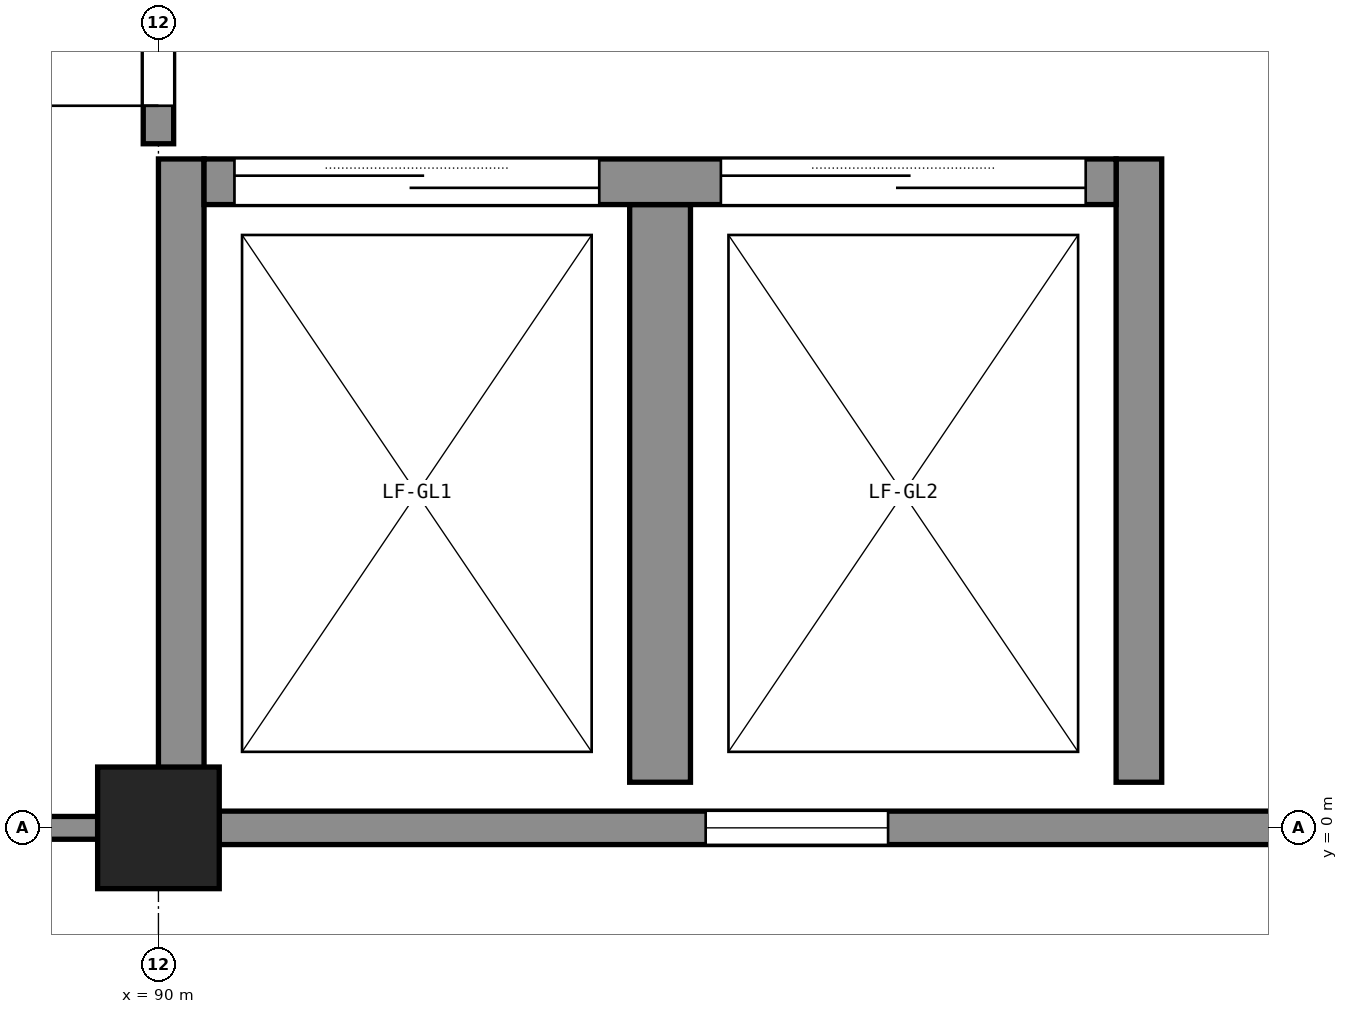
"""IFC4 building model, lengths in metres.
Left out: names, types, materials, properties, quantities, classifications, styles, units other than length and angle.
Written with IfcOpenShell. Run it as: python <this file> out.ifc"""

import sys

from ifc_helpers import new_model, si_unit, direction, frame, frame_2d, origin, origin_2d, place, context, subcontext, project, spatial, rectangle, extrude, element, fill, save


model = new_model("IFC4")
c1 = context("Model", 3, precision=1e-05, world=origin(), true_north=direction((0.0, 1.0)))
c2 = subcontext(c1, "Body", "Model", "MODEL_VIEW")
j1 = project(units=[si_unit("LENGTHUNIT", "METRE"), si_unit("PLANEANGLEUNIT", "RADIAN")], contexts=[c1])
p1 = place(None, origin())
s1 = spatial("IfcSite", under=j1, at=p1, CompositionType="ELEMENT")
p2 = place(p1, origin())
s2 = spatial("IfcBuilding", under=s1, at=p2, CompositionType="ELEMENT")
p3 = place(p2, origin())
s3 = spatial("IfcBuildingStorey", under=s2, at=p3, CompositionType="ELEMENT", Elevation=0.0)
for number, where, z_axis, x_axis in (
    (1, (90.15, 0.3, -1.8), (0.0, 0.0, 1.0), (0.0, 1.0, 0.0)),
    (2, (96.45, 0.3, -1.8), (0.0, 0.0, 1.0), (0.0, 1.0, 0.0)),
):
    element("IfcWall", number, at=place(p3, frame(where, z_axis=z_axis, x_axis=x_axis)), inside=s3, PredefinedType="SHEAR", context=c2, shape_type="SweptSolid", body=[
        extrude(rectangle(XDim=4.1, YDim=0.3, at=frame_2d((2.05, 0.0))), origin(), (0.0, 0.0, 1.0), 7.3),
    ])
p4 = place(p3, frame((90.3, 4.25, -1.8), z_axis=(0.0, 0.0, 1.0), x_axis=(1.0, 0.0, 0.0)))
e3 = element("IfcWall", 3, at=p4, inside=s3, PredefinedType="SHEAR", context=c2, shape_type="SweptSolid", body=[
    extrude(rectangle(XDim=6.0, YDim=0.3, at=frame_2d((3.0, 0.0))), origin(), (0.0, 0.0, 1.0), 7.3),
])
p5 = place(p4, frame((0.2, 0.0, 1.8)))
e4 = element("IfcOpeningElement", 4, at=p5, cuts=e3, PredefinedType="OPENING", context=c2, shape_type="SweptSolid", body=[
    extrude(rectangle(XDim=2.4, YDim=2.4, at=frame_2d((1.2, 1.2))), frame((0.0, 0.16, 0.0), z_axis=(0.0, -1.0, 0.0), x_axis=(1.0, 0.0, 0.0)), (0.0, 0.0, 1.0), 0.32),
])
p6 = place(p4, frame((3.4, 0.0, 1.8)))
e5 = element("IfcOpeningElement", 5, at=p6, cuts=e3, PredefinedType="OPENING", context=c2, shape_type="SweptSolid", body=[
    extrude(rectangle(XDim=2.4, YDim=2.4, at=frame_2d((1.2, 1.2))), frame((0.0, 0.16, 0.0), z_axis=(0.0, -1.0, 0.0), x_axis=(1.0, 0.0, 0.0)), (0.0, 0.0, 1.0), 0.32),
])
p7 = place(p3, frame((93.3, 0.3, -1.8), z_axis=(0.0, 0.0, 1.0), x_axis=(0.0, 1.0, 0.0)))
e6 = element("IfcWall", 6, at=p7, inside=s3, PredefinedType="SHEAR", context=c2, shape_type="SweptSolid", body=[
    extrude(rectangle(XDim=3.8, YDim=0.4, at=frame_2d((1.9, 0.0))), origin(), (0.0, 0.0, 1.0), 7.3),
])
p8 = place(p3, frame((90.0, 0.0, -0.3), z_axis=(0.0, 0.0, 1.0), x_axis=(1.0, 0.0, 0.0)))
e7 = element("IfcColumn", 7, at=p8, inside=s3, PredefinedType="COLUMN", context=c2, shape_type="SweptSolid", body=[
    extrude(rectangle(XDim=0.8, YDim=0.8, at=origin_2d()), origin(), (0.0, 0.0, 1.0), 5.8),
])
p9 = place(p3, frame((82.0, 0.0, 0.0), z_axis=(0.0, 0.0, 1.0), x_axis=(1.0, 0.0, 0.0)))
e8 = element("IfcWall", 8, at=p9, inside=s3, PredefinedType="ELEMENTEDWALL", context=c2, shape_type="SweptSolid", body=[
    extrude(rectangle(XDim=7.6, YDim=0.15, at=frame_2d((3.8, 0.0))), origin(), (0.0, 0.0, 1.0), 4.44),
])
p10 = place(p9, frame((1.7, 0.0, 0.0)))
e9 = element("IfcOpeningElement", 9, at=p10, cuts=e8, PredefinedType="OPENING", context=c2, shape_type="SweptSolid", body=[
    extrude(rectangle(XDim=4.2, YDim=4.34, at=frame_2d((2.1, 2.17))), frame((0.0, 0.085, 0.0), z_axis=(0.0, -1.0, 0.0), x_axis=(1.0, 0.0, 0.0)), (0.0, 0.0, 1.0), 0.17),
])
p11 = place(p3, frame((90.4, 0.0, 0.0), z_axis=(0.0, 0.0, 1.0), x_axis=(1.0, 0.0, 0.0)))
e10 = element("IfcWall", 10, at=p11, inside=s3, PredefinedType="SOLIDWALL", context=c2, shape_type="SweptSolid", body=[
    extrude(rectangle(XDim=7.6, YDim=0.22, at=frame_2d((3.8, 0.0))), origin(), (0.0, 0.0, 1.0), 4.44),
])
p12 = place(p11, frame((3.2, 0.0, 2.1)))
e11 = element("IfcOpeningElement", 11, at=p12, cuts=e10, PredefinedType="OPENING", context=c2, shape_type="SweptSolid", body=[
    extrude(rectangle(XDim=1.2, YDim=0.6, at=frame_2d((0.6, 0.3))), frame((0.0, 0.12, 0.0), z_axis=(0.0, -1.0, 0.0), x_axis=(1.0, 0.0, 0.0)), (0.0, 0.0, 1.0), 0.24),
])
p13 = place(p3, frame((90.0, 4.5, 0.0), z_axis=(0.0, 0.0, 1.0), x_axis=(0.0, 1.0, 0.0)))
e12 = element("IfcWall", 12, at=p13, inside=s3, PredefinedType="PARTITIONING", context=c2, shape_type="SweptSolid", body=[
    extrude(rectangle(XDim=3.5, YDim=0.2, at=frame_2d((1.75, 0.0))), origin(), (0.0, 0.0, 1.0), 4.4),
])
p14 = place(p13, frame((0.25, 0.0, 0.0)))
e13 = element("IfcOpeningElement", 13, at=p14, cuts=e12, PredefinedType="OPENING", context=c2, shape_type="SweptSolid", body=[
    extrude(rectangle(XDim=3.0, YDim=3.0, at=frame_2d((1.5, 1.5))), frame((0.0, 0.11, 0.0), z_axis=(0.0, -1.0, 0.0), x_axis=(1.0, 0.0, 0.0)), (0.0, 0.0, 1.0), 0.22),
])
p15 = place(p12, origin())
e14 = element("IfcWindow", 14, at=p15, inside=s3, PartitioningType="SINGLE_PANEL", PredefinedType="WINDOW", context=c2, shape_type="SweptSolid", body=[
    extrude(rectangle(XDim=1.2, YDim=0.6, at=frame_2d((0.6, 0.3))), frame((0.0, 0.09, 0.0), z_axis=(0.0, -1.0, 0.0), x_axis=(1.0, 0.0, 0.0)), (0.0, 0.0, 1.0), 0.06),
])
fill(e11, e14)
p16 = place(p14, origin())
e15 = element("IfcDoor", 15, at=p16, inside=s3, OperationType="DOUBLE_DOOR_SINGLE_SWING", PredefinedType="DOOR", context=c2, shape_type="SweptSolid", body=[
    extrude(rectangle(XDim=3.0, YDim=3.0, at=frame_2d((1.5, 1.5))), frame((0.0, 0.025, 0.0), z_axis=(0.0, -1.0, 0.0), x_axis=(1.0, 0.0, 0.0)), (0.0, 0.0, 1.0), 0.05),
])
fill(e13, e15)
p17 = place(p5, origin())
e16 = element("IfcDoor", 16, at=p17, inside=s3, OperationType="DOUBLE_DOOR_SLIDING", PredefinedType="DOOR", context=c2, shape_type="SweptSolid", body=[
    extrude(rectangle(XDim=2.4, YDim=2.4, at=frame_2d((1.2, 1.2))), frame((0.0, 0.025, 0.0), z_axis=(0.0, -1.0, 0.0), x_axis=(1.0, 0.0, 0.0)), (0.0, 0.0, 1.0), 0.05),
])
fill(e4, e16)
p18 = place(p6, origin())
e17 = element("IfcDoor", 17, at=p18, inside=s3, OperationType="DOUBLE_DOOR_SLIDING", PredefinedType="DOOR", context=c2, shape_type="SweptSolid", body=[
    extrude(rectangle(XDim=2.4, YDim=2.4, at=frame_2d((1.2, 1.2))), frame((0.0, 0.025, 0.0), z_axis=(0.0, -1.0, 0.0), x_axis=(1.0, 0.0, 0.0)), (0.0, 0.0, 1.0), 0.05),
])
fill(e5, e17)
save(model, sys.argv[1])
